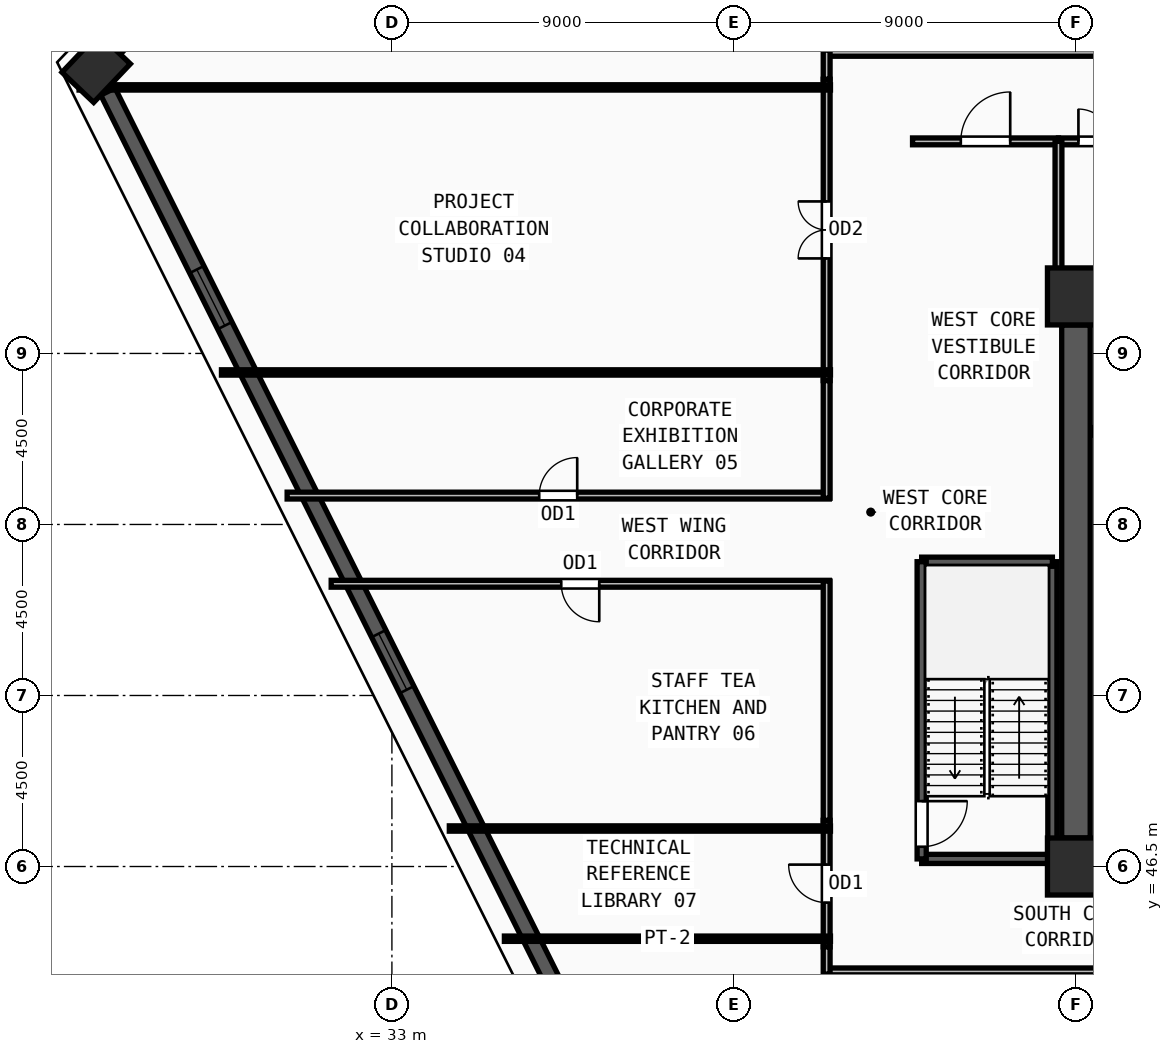
"""IFC4 building model, lengths in metres.
Left out: names, types, materials, properties, quantities, classifications, styles, units other than length and angle.
Written with IfcOpenShell. Run it as: python <this file> out.ifc"""

import sys

from ifc_helpers import new_model, si_unit, direction, frame, frame_2d, origin, origin_2d, place, context, subcontext, project, spatial, rectangle, extrude, source, transform, mapped, element, fill, save


model = new_model("IFC4")
c1 = context("Model", 3, precision=1e-05, world=origin(), true_north=direction((0.0, 1.0)))
c2 = subcontext(c1, "Body", "Model", "MODEL_VIEW")
j1 = project(units=[si_unit("LENGTHUNIT", "METRE"), si_unit("PLANEANGLEUNIT", "RADIAN")], contexts=[c1])
p1 = place(None, origin())
s1 = spatial("IfcSite", under=j1, at=p1, CompositionType="ELEMENT")
p2 = place(p1, origin())
s2 = spatial("IfcBuilding", under=s1, at=p2, CompositionType="ELEMENT")
p3 = place(p2, frame((0.0, 0.0, 166.5)))
s3 = spatial("IfcBuildingStorey", under=s2, at=p3, CompositionType="ELEMENT", Elevation=166.5)
m1 = source(origin(), c2, "Body", "SweptSolid", [
    extrude(rectangle(XDim=1.5, YDim=1.5, at=origin_2d()), origin(), (0.0, 0.0, 1.0), 3.75),
])
for number, where, z_axis, x_axis in (
    (1, (51.0, 46.5, 0.0), (0.0, 0.0, 1.0), (1.0, 0.0, 0.0)),
    (2, (51.0, 61.5, 0.0), (0.0, 0.0, 1.0), (1.0, 0.0, 0.0)),
):
    element("IfcColumn", number, at=place(p3, frame(where, z_axis=z_axis, x_axis=x_axis)), inside=s3, PredefinedType="COLUMN", context=c2, shape_type="MappedRepresentation", body=[
        mapped(m1, transform((0.0, 0.0, 0.0), x_axis=(1.0, 0.0, 0.0), y_axis=(0.0, 1.0, 0.0), z_axis=(0.0, 0.0, 1.0), scale=1.0)),
    ])
m2 = source(origin(), c2, "Body", "SweptSolid", [
    extrude(rectangle(XDim=1.4, YDim=1.15, at=origin_2d()), origin(), (0.0, 0.0, 1.0), 3.75),
])
p4 = place(p3, frame((25.218, 67.508, 0.0), z_axis=(0.0, 0.0, 1.0), x_axis=(0.689240273721, 0.724532846102, 0.0)))
e3 = element("IfcColumn", 3, at=p4, inside=s3, PredefinedType="COLUMN", context=c2, shape_type="MappedRepresentation", body=[
    mapped(m2, transform((0.0, 0.0, 0.0), x_axis=(1.0, 0.0, 0.0), y_axis=(0.0, 1.0, 0.0), z_axis=(0.0, 0.0, 1.0), scale=1.0)),
])
p5 = place(p3, frame((28.778, 71.251, 0.0), z_axis=(0.0, 0.0, 1.0), x_axis=(-0.689126443885, -0.724641114165, 0.0)))
e4 = element("IfcWall", 4, at=p5, inside=s3, PredefinedType="SOLIDWALL", context=c2, shape_type="SweptSolid", body=[
    extrude(rectangle(XDim=4.475, YDim=0.42, at=frame_2d((2.238, 0.0))), origin(), (0.0, 0.0, 1.0), 3.57),
])
m3 = source(origin(), c2, "Body", "SweptSolid", [
    extrude(rectangle(XDim=1.2, YDim=1.9, at=frame_2d((0.6, 0.95))), frame((0.0, 0.22, 0.0), z_axis=(0.0, -1.0, 0.0), x_axis=(1.0, 0.0, 0.0)), (0.0, 0.0, 1.0), 0.44),
])
p6 = place(p5, frame((1.638, 0.0, 0.55)))
e5 = element("IfcOpeningElement", 5, at=p6, cuts=e4, PredefinedType="OPENING", context=c2, shape_type="MappedRepresentation", body=[
    mapped(m3, transform((0.0, 0.0, 0.0), x_axis=(1.0, 0.0, 0.0), y_axis=(0.0, 1.0, 0.0), z_axis=(0.0, 0.0, 1.0), scale=1.0)),
])
p7 = place(p3, frame((25.526, 66.891, 0.0), z_axis=(0.0, 0.0, 1.0), x_axis=(0.446995422188, -0.894536244399, 0.0)))
e6 = element("IfcWall", 6, at=p7, inside=s3, PredefinedType="SOLIDWALL", context=c2, shape_type="SweptSolid", body=[
    extrude(rectangle(XDim=30.439, YDim=0.42, at=frame_2d((15.22, 0.0))), origin(), (0.0, 0.0, 1.0), 3.57),
])
m4 = source(origin(), c2, "Body", "SweptSolid", [
    extrude(rectangle(XDim=1.65, YDim=1.95, at=frame_2d((0.825, 0.975))), frame((0.0, 0.22, 0.0), z_axis=(0.0, -1.0, 0.0), x_axis=(1.0, 0.0, 0.0)), (0.0, 0.0, 1.0), 0.44),
])
p8 = place(p7, frame((5.235, 0.0, 0.55)))
e7 = element("IfcOpeningElement", 7, at=p8, cuts=e6, PredefinedType="OPENING", context=c2, shape_type="MappedRepresentation", body=[
    mapped(m4, transform((0.0, 0.0, 0.0), x_axis=(1.0, 0.0, 0.0), y_axis=(0.0, 1.0, 0.0), z_axis=(0.0, 0.0, 1.0), scale=1.0)),
])
p9 = place(p7, frame((15.945, 0.0, 0.55)))
e8 = element("IfcOpeningElement", 8, at=p9, cuts=e6, PredefinedType="OPENING", context=c2, shape_type="MappedRepresentation", body=[
    mapped(m4, transform((0.0, 0.0, 0.0), x_axis=(1.0, 0.0, 0.0), y_axis=(0.0, 1.0, 0.0), z_axis=(0.0, 0.0, 1.0), scale=1.0)),
])
p10 = place(p3, frame((51.0, 47.25, 0.0), z_axis=(0.0, 0.0, 1.0), x_axis=(0.0, 1.0, 0.0)))
e9 = element("IfcWall", 9, at=p10, inside=s3, PredefinedType="SHEAR", context=c2, shape_type="SweptSolid", body=[
    extrude(rectangle(XDim=13.5, YDim=0.75, at=frame_2d((6.75, 0.0))), origin(), (0.0, 0.0, 1.0), 3.57),
])
p11 = place(p3, frame((46.94, 46.7, 0.0), z_axis=(0.0, 0.0, 1.0), x_axis=(1.0, 0.0, 0.0)))
e10 = element("IfcWall", 10, at=p11, inside=s3, PredefinedType="SOLIDWALL", context=c2, shape_type="SweptSolid", body=[
    extrude(rectangle(XDim=3.44, YDim=0.24, at=frame_2d((1.72, 0.0))), origin(), (0.0, 0.0, 1.0), 3.57),
])
p12 = place(p3, frame((50.38, 46.7, 0.0), z_axis=(0.0, 0.0, 1.0), x_axis=(0.0, 1.0, 0.0)))
e11 = element("IfcWall", 11, at=p12, inside=s3, PredefinedType="SOLIDWALL", context=c2, shape_type="SweptSolid", body=[
    extrude(rectangle(XDim=7.82, YDim=0.24, at=frame_2d((3.91, 0.0))), origin(), (0.0, 0.0, 1.0), 3.57),
])
p13 = place(p3, frame((50.38, 54.52, 0.0), z_axis=(0.0, 0.0, 1.0), x_axis=(-1.0, 0.0, 0.0)))
e12 = element("IfcWall", 12, at=p13, inside=s3, PredefinedType="SOLIDWALL", context=c2, shape_type="SweptSolid", body=[
    extrude(rectangle(XDim=3.44, YDim=0.24, at=frame_2d((1.72, 0.0))), origin(), (0.0, 0.0, 1.0), 3.57),
])
p14 = place(p3, frame((46.94, 54.52, 0.0), z_axis=(0.0, 0.0, 1.0), x_axis=(0.0, -1.0, 0.0)))
e13 = element("IfcWall", 13, at=p14, inside=s3, PredefinedType="SOLIDWALL", context=c2, shape_type="SweptSolid", body=[
    extrude(rectangle(XDim=7.82, YDim=0.24, at=frame_2d((3.91, 0.0))), origin(), (0.0, 0.0, 1.0), 3.57),
])
m5 = source(origin(), c2, "Body", "SweptSolid", [
    extrude(rectangle(XDim=1.2, YDim=2.2, at=frame_2d((0.6, 1.1))), frame((0.0, 0.13, 0.0), z_axis=(0.0, -1.0, 0.0), x_axis=(1.0, 0.0, 0.0)), (0.0, 0.0, 1.0), 0.26),
])
p15 = place(p14, frame((6.3, 0.0, 0.0)))
e14 = element("IfcOpeningElement", 14, at=p15, cuts=e13, PredefinedType="OPENING", context=c2, shape_type="MappedRepresentation", body=[
    mapped(m5, transform((0.0, 0.0, 0.0), x_axis=(1.0, 0.0, 0.0), y_axis=(0.0, 1.0, 0.0), z_axis=(0.0, 0.0, 1.0), scale=1.0)),
])
for number, where, z_axis, x_axis in (
    (15, (51.4, 57.95, 0.0), (0.0, 0.0, 1.0), (1.0, 0.0, 0.0)),
    (16, (53.8, 60.88, 0.0), (0.0, 0.0, 1.0), (-1.0, 0.0, 0.0)),
):
    element("IfcWall", number, at=place(p3, frame(where, z_axis=z_axis, x_axis=x_axis)), inside=s3, PredefinedType="SOLIDWALL", context=c2, shape_type="SweptSolid", body=[
        extrude(rectangle(XDim=2.4, YDim=0.2, at=frame_2d((1.2, 0.0))), origin(), (0.0, 0.0, 1.0), 3.57),
    ])
p16 = place(p3, frame((50.54, 65.58, 0.0), z_axis=(0.0, 0.0, 1.0), x_axis=(1.0, 0.0, 0.0)))
e17 = element("IfcWall", 17, at=p16, inside=s3, PredefinedType="PARTITIONING", context=c2, shape_type="SweptSolid", body=[
    extrude(rectangle(XDim=1.9, YDim=0.18, at=frame_2d((0.95, 0.0))), origin(), (0.0, 0.0, 1.0), 3.57),
])
m6 = source(origin(), c2, "Body", "SweptSolid", [
    extrude(rectangle(XDim=0.85, YDim=2.1, at=frame_2d((0.425, 1.05))), frame((0.0, 0.1, 0.0), z_axis=(0.0, -1.0, 0.0), x_axis=(1.0, 0.0, 0.0)), (0.0, 0.0, 1.0), 0.2),
])
p17 = place(p16, frame((0.525, 0.0, 0.0)))
e18 = element("IfcOpeningElement", 18, at=p17, cuts=e17, PredefinedType="OPENING", context=c2, shape_type="MappedRepresentation", body=[
    mapped(m6, transform((0.0, 0.0, 0.0), x_axis=(1.0, 0.0, 0.0), y_axis=(0.0, 1.0, 0.0), z_axis=(0.0, 0.0, 1.0), scale=1.0)),
])
p18 = place(p3, frame((46.7, 65.58, 0.0), z_axis=(0.0, 0.0, 1.0), x_axis=(1.0, 0.0, 0.0)))
e19 = element("IfcWall", 19, at=p18, inside=s3, PredefinedType="PARTITIONING", context=c2, shape_type="SweptSolid", body=[
    extrude(rectangle(XDim=3.84, YDim=0.18, at=frame_2d((1.92, 0.0))), origin(), (0.0, 0.0, 1.0), 3.57),
])
m7 = source(origin(), c2, "Body", "SweptSolid", [
    extrude(rectangle(XDim=1.3, YDim=2.2, at=frame_2d((0.65, 1.1))), frame((0.0, 0.1, 0.0), z_axis=(0.0, -1.0, 0.0), x_axis=(1.0, 0.0, 0.0)), (0.0, 0.0, 1.0), 0.2),
])
p19 = place(p18, frame((1.27, 0.0, 0.0)))
e20 = element("IfcOpeningElement", 20, at=p19, cuts=e19, PredefinedType="OPENING", context=c2, shape_type="MappedRepresentation", body=[
    mapped(m7, transform((0.0, 0.0, 0.0), x_axis=(1.0, 0.0, 0.0), y_axis=(0.0, 1.0, 0.0), z_axis=(0.0, 0.0, 1.0), scale=1.0)),
])
p20 = place(p3, frame((44.37, 67.91, 0.0), z_axis=(0.0, 0.0, 1.0), x_axis=(1.0, 0.0, 0.0)))
e21 = element("IfcWall", 21, at=p20, inside=s3, PredefinedType="PARTITIONING", context=c2, shape_type="SweptSolid", body=[
    extrude(rectangle(XDim=17.415, YDim=0.18, at=frame_2d((8.708, 0.0))), origin(), (0.0, 0.0, 1.0), 3.57),
])
m8 = source(origin(), c2, "Body", "SweptSolid", [
    extrude(rectangle(XDim=1.5, YDim=2.2, at=frame_2d((0.75, 1.1))), frame((0.0, 0.1, 0.0), z_axis=(0.0, -1.0, 0.0), x_axis=(1.0, 0.0, 0.0)), (0.0, 0.0, 1.0), 0.2),
])
p21 = place(p20, frame((7.957, 0.0, 0.0)))
e22 = element("IfcOpeningElement", 22, at=p21, cuts=e21, PredefinedType="OPENING", context=c2, shape_type="MappedRepresentation", body=[
    mapped(m8, transform((0.0, 0.0, 0.0), x_axis=(1.0, 0.0, 0.0), y_axis=(0.0, 1.0, 0.0), z_axis=(0.0, 0.0, 1.0), scale=1.0)),
])
p22 = place(p3, frame((44.44, 59.285, 0.0), z_axis=(0.0, 0.0, 1.0), x_axis=(0.0, 1.0, 0.0)))
e23 = element("IfcWall", 23, at=p22, inside=s3, PredefinedType="PARTITIONING", context=c2, shape_type="SweptSolid", body=[
    extrude(rectangle(XDim=7.93, YDim=0.18, at=frame_2d((3.965, 0.0))), origin(), (0.0, 0.0, 1.0), 3.57),
])
p23 = place(p22, frame((3.215, 0.0, 0.0)))
e24 = element("IfcOpeningElement", 24, at=p23, cuts=e23, PredefinedType="OPENING", context=c2, shape_type="MappedRepresentation", body=[
    mapped(m8, transform((0.0, 0.0, 0.0), x_axis=(1.0, 0.0, 0.0), y_axis=(0.0, 1.0, 0.0), z_axis=(0.0, 0.0, 1.0), scale=1.0)),
])
p24 = place(p3, frame((30.243, 56.26, 0.0), z_axis=(0.0, 0.0, 1.0), x_axis=(1.0, 0.0, 0.0)))
e25 = element("IfcWall", 25, at=p24, inside=s3, PredefinedType="PARTITIONING", context=c2, shape_type="SweptSolid", body=[
    extrude(rectangle(XDim=14.267, YDim=0.18, at=frame_2d((7.134, 0.0))), origin(), (0.0, 0.0, 1.0), 3.57),
])
m9 = source(origin(), c2, "Body", "SweptSolid", [
    extrude(rectangle(XDim=1.0, YDim=2.2, at=frame_2d((0.5, 1.1))), frame((0.0, 0.1, 0.0), z_axis=(0.0, -1.0, 0.0), x_axis=(1.0, 0.0, 0.0)), (0.0, 0.0, 1.0), 0.2),
])
p25 = place(p24, frame((6.633, 0.0, 0.0)))
e26 = element("IfcOpeningElement", 26, at=p25, cuts=e25, PredefinedType="OPENING", context=c2, shape_type="MappedRepresentation", body=[
    mapped(m9, transform((0.0, 0.0, 0.0), x_axis=(1.0, 0.0, 0.0), y_axis=(0.0, 1.0, 0.0), z_axis=(0.0, 0.0, 1.0), scale=1.0)),
])
p26 = place(p3, frame((44.51, 53.94, 0.0), z_axis=(0.0, 0.0, 1.0), x_axis=(-1.0, 0.0, 0.0)))
e27 = element("IfcWall", 27, at=p26, inside=s3, PredefinedType="PARTITIONING", context=c2, shape_type="SweptSolid", body=[
    extrude(rectangle(XDim=13.108, YDim=0.18, at=frame_2d((6.554, 0.0))), origin(), (0.0, 0.0, 1.0), 3.57),
])
p27 = place(p26, frame((6.054, 0.0, 0.0)))
e28 = element("IfcOpeningElement", 28, at=p27, cuts=e27, PredefinedType="OPENING", context=c2, shape_type="MappedRepresentation", body=[
    mapped(m9, transform((0.0, 0.0, 0.0), x_axis=(1.0, 0.0, 0.0), y_axis=(0.0, 1.0, 0.0), z_axis=(0.0, 0.0, 1.0), scale=1.0)),
])
p28 = place(p3, frame((44.44, 44.385, 0.0), z_axis=(0.0, 0.0, 1.0), x_axis=(0.0, 1.0, 0.0)))
e29 = element("IfcWall", 29, at=p28, inside=s3, PredefinedType="PARTITIONING", context=c2, shape_type="SweptSolid", body=[
    extrude(rectangle(XDim=3.33, YDim=0.18, at=frame_2d((1.665, 0.0))), origin(), (0.0, 0.0, 1.0), 3.57),
])
p29 = place(p28, frame((1.165, 0.0, 0.0)))
e30 = element("IfcOpeningElement", 30, at=p29, cuts=e29, PredefinedType="OPENING", context=c2, shape_type="MappedRepresentation", body=[
    mapped(m9, transform((0.0, 0.0, 0.0), x_axis=(1.0, 0.0, 0.0), y_axis=(0.0, 1.0, 0.0), z_axis=(0.0, 0.0, 1.0), scale=1.0)),
])
p30 = place(p3, frame((75.63, 43.74, 0.0), z_axis=(0.0, 0.0, 1.0), x_axis=(-1.0, 0.0, 0.0)))
e31 = element("IfcWall", 31, at=p30, inside=s3, PredefinedType="PARTITIONING", context=c2, shape_type="SweptSolid", body=[
    extrude(rectangle(XDim=31.26, YDim=0.18, at=frame_2d((15.63, 0.0))), origin(), (0.0, 0.0, 1.0), 3.57),
])
p31 = place(p30, frame((10.08, 0.0, 0.0)))
e32 = element("IfcOpeningElement", 32, at=p31, cuts=e31, PredefinedType="OPENING", context=c2, shape_type="MappedRepresentation", body=[
    mapped(m8, transform((0.0, 0.0, 0.0), x_axis=(1.0, 0.0, 0.0), y_axis=(0.0, 1.0, 0.0), z_axis=(0.0, 0.0, 1.0), scale=1.0)),
])
p32 = place(p3, frame((50.54, 61.95, 0.0), z_axis=(0.0, 0.0, 1.0), x_axis=(0.0, 1.0, 0.0)))
e33 = element("IfcWall", 33, at=p32, inside=s3, PredefinedType="PARTITIONING", context=c2, shape_type="SweptSolid", body=[
    extrude(rectangle(XDim=3.63, YDim=0.18, at=frame_2d((1.815, 0.0))), origin(), (0.0, 0.0, 1.0), 3.57),
])
p33 = place(p3, frame((44.44, 67.215, 0.0), z_axis=(0.0, 0.0, 1.0), x_axis=(0.0, 1.0, 0.0)))
e34 = element("IfcWall", 34, at=p33, inside=s3, PredefinedType="PARTITIONING", context=c2, shape_type="SweptSolid", body=[
    extrude(rectangle(XDim=0.765, YDim=0.18, at=frame_2d((0.382, 0.0))), origin(), (0.0, 0.0, 1.0), 3.57),
])
p34 = place(p3, frame((44.44, 56.19, 0.0), z_axis=(0.0, 0.0, 1.0), x_axis=(0.0, 1.0, 0.0)))
e35 = element("IfcWall", 35, at=p34, inside=s3, PredefinedType="PARTITIONING", context=c2, shape_type="SweptSolid", body=[
    extrude(rectangle(XDim=3.095, YDim=0.18, at=frame_2d((1.547, 0.0))), origin(), (0.0, 0.0, 1.0), 3.57),
])
p35 = place(p3, frame((44.44, 47.715, 0.0), z_axis=(0.0, 0.0, 1.0), x_axis=(0.0, 1.0, 0.0)))
e36 = element("IfcWall", 36, at=p35, inside=s3, PredefinedType="PARTITIONING", context=c2, shape_type="SweptSolid", body=[
    extrude(rectangle(XDim=6.295, YDim=0.18, at=frame_2d((3.147, 0.0))), origin(), (0.0, 0.0, 1.0), 3.57),
])
p36 = place(p3, frame((44.44, 43.67, 0.0), z_axis=(0.0, 0.0, 1.0), x_axis=(0.0, 1.0, 0.0)))
e37 = element("IfcWall", 37, at=p36, inside=s3, PredefinedType="PARTITIONING", context=c2, shape_type="SweptSolid", body=[
    extrude(rectangle(XDim=0.715, YDim=0.18, at=frame_2d((0.357, 0.0))), origin(), (0.0, 0.0, 1.0), 3.57),
])
p37 = place(p3, frame((44.54, 44.6, 0.0), z_axis=(0.0, 0.0, 1.0), x_axis=(-1.0, 0.0, 0.0)))
e38 = element("IfcWall", 38, at=p37, inside=s3, PredefinedType="PARTITIONING", context=c2, shape_type="SweptSolid", body=[
    extrude(rectangle(XDim=8.58, YDim=0.14, at=frame_2d((4.29, 0.0))), origin(), (0.0, 0.0, 1.0), 3.57),
])
p38 = place(p3, frame((44.54, 47.5, 0.0), z_axis=(0.0, 0.0, 1.0), x_axis=(-1.0, 0.0, 0.0)))
e39 = element("IfcWall", 39, at=p38, inside=s3, PredefinedType="PARTITIONING", context=c2, shape_type="SweptSolid", body=[
    extrude(rectangle(XDim=10.029, YDim=0.14, at=frame_2d((5.015, 0.0))), origin(), (0.0, 0.0, 1.0), 3.57),
])
p39 = place(p3, frame((44.54, 59.5, 0.0), z_axis=(0.0, 0.0, 1.0), x_axis=(-1.0, 0.0, 0.0)))
e40 = element("IfcWall", 40, at=p39, inside=s3, PredefinedType="PARTITIONING", context=c2, shape_type="SweptSolid", body=[
    extrude(rectangle(XDim=16.025, YDim=0.14, at=frame_2d((8.013, 0.0))), origin(), (0.0, 0.0, 1.0), 3.57),
])
p40 = place(p3, frame((44.54, 67.0, 0.0), z_axis=(0.0, 0.0, 1.0), x_axis=(-1.0, 0.0, 0.0)))
e41 = element("IfcWall", 41, at=p40, inside=s3, PredefinedType="PARTITIONING", context=c2, shape_type="SweptSolid", body=[
    extrude(rectangle(XDim=19.772, YDim=0.14, at=frame_2d((9.886, 0.0))), origin(), (0.0, 0.0, 1.0), 2.755),
])
m10 = source(origin(), c2, "Body", "SweptSolid", [
    extrude(rectangle(XDim=1.65, YDim=1.95, at=frame_2d((0.825, 0.975))), frame((0.0, 0.03, 0.0), z_axis=(0.0, -1.0, 0.0), x_axis=(1.0, 0.0, 0.0)), (0.0, 0.0, 1.0), 0.06),
])
p41 = place(p8, origin())
e42 = element("IfcWindow", 42, at=p41, inside=s3, PartitioningType="DOUBLE_PANEL_VERTICAL", PredefinedType="WINDOW", context=c2, shape_type="MappedRepresentation", body=[
    mapped(m10, transform((0.0, 0.0, 0.0), x_axis=(1.0, 0.0, 0.0), y_axis=(0.0, 1.0, 0.0), z_axis=(0.0, 0.0, 1.0), scale=1.0)),
])
fill(e7, e42)
p42 = place(p9, origin())
e43 = element("IfcWindow", 43, at=p42, inside=s3, PartitioningType="DOUBLE_PANEL_VERTICAL", PredefinedType="WINDOW", context=c2, shape_type="MappedRepresentation", body=[
    mapped(m10, transform((0.0, 0.0, 0.0), x_axis=(1.0, 0.0, 0.0), y_axis=(0.0, 1.0, 0.0), z_axis=(0.0, 0.0, 1.0), scale=1.0)),
])
fill(e8, e43)
m11 = source(origin(), c2, "Body", "SweptSolid", [
    extrude(rectangle(XDim=1.2, YDim=2.2, at=frame_2d((0.6, 1.1))), frame((0.0, 0.025, 0.0), z_axis=(0.0, -1.0, 0.0), x_axis=(1.0, 0.0, 0.0)), (0.0, 0.0, 1.0), 0.05),
])
p43 = place(p15, origin())
e44 = element("IfcDoor", 44, at=p43, inside=s3, OperationType="SINGLE_SWING_LEFT", PredefinedType="DOOR", context=c2, shape_type="MappedRepresentation", body=[
    mapped(m11, transform((0.0, 0.0, 0.0), x_axis=(1.0, 0.0, 0.0), y_axis=(0.0, 1.0, 0.0), z_axis=(0.0, 0.0, 1.0), scale=1.0)),
])
fill(e14, e44)
m12 = source(origin(), c2, "Body", "SweptSolid", [
    extrude(rectangle(XDim=0.85, YDim=2.1, at=frame_2d((0.425, 1.05))), frame((0.0, 0.025, 0.0), z_axis=(0.0, -1.0, 0.0), x_axis=(1.0, 0.0, 0.0)), (0.0, 0.0, 1.0), 0.05),
])
p44 = place(p17, origin())
e45 = element("IfcDoor", 45, at=p44, inside=s3, OperationType="SINGLE_SWING_LEFT", PredefinedType="DOOR", context=c2, shape_type="MappedRepresentation", body=[
    mapped(m12, transform((0.0, 0.0, 0.0), x_axis=(1.0, 0.0, 0.0), y_axis=(0.0, 1.0, 0.0), z_axis=(0.0, 0.0, 1.0), scale=1.0)),
])
fill(e18, e45)
m13 = source(origin(), c2, "Body", "SweptSolid", [
    extrude(rectangle(XDim=1.3, YDim=2.2, at=frame_2d((0.65, 1.1))), frame((0.0, 0.025, 0.0), z_axis=(0.0, -1.0, 0.0), x_axis=(1.0, 0.0, 0.0)), (0.0, 0.0, 1.0), 0.05),
])
p45 = place(p19, origin())
e46 = element("IfcDoor", 46, at=p45, inside=s3, OperationType="SINGLE_SWING_RIGHT", PredefinedType="DOOR", context=c2, shape_type="MappedRepresentation", body=[
    mapped(m13, transform((0.0, 0.0, 0.0), x_axis=(1.0, 0.0, 0.0), y_axis=(0.0, 1.0, 0.0), z_axis=(0.0, 0.0, 1.0), scale=1.0)),
])
fill(e20, e46)
m14 = source(origin(), c2, "Body", "SweptSolid", [
    extrude(rectangle(XDim=1.5, YDim=2.2, at=frame_2d((0.75, 1.1))), frame((0.0, 0.025, 0.0), z_axis=(0.0, -1.0, 0.0), x_axis=(1.0, 0.0, 0.0)), (0.0, 0.0, 1.0), 0.05),
])
p46 = place(p23, origin())
e47 = element("IfcDoor", 47, at=p46, inside=s3, OperationType="DOUBLE_DOOR_SINGLE_SWING", PredefinedType="DOOR", context=c2, shape_type="MappedRepresentation", body=[
    mapped(m14, transform((0.0, 0.0, 0.0), x_axis=(1.0, 0.0, 0.0), y_axis=(0.0, 1.0, 0.0), z_axis=(0.0, 0.0, 1.0), scale=1.0)),
])
fill(e24, e47)
m15 = source(origin(), c2, "Body", "SweptSolid", [
    extrude(rectangle(XDim=1.0, YDim=2.2, at=frame_2d((0.5, 1.1))), frame((0.0, 0.025, 0.0), z_axis=(0.0, -1.0, 0.0), x_axis=(1.0, 0.0, 0.0)), (0.0, 0.0, 1.0), 0.05),
])
p47 = place(p25, origin())
e48 = element("IfcDoor", 48, at=p47, inside=s3, OperationType="SINGLE_SWING_RIGHT", PredefinedType="DOOR", context=c2, shape_type="MappedRepresentation", body=[
    mapped(m15, transform((0.0, 0.0, 0.0), x_axis=(1.0, 0.0, 0.0), y_axis=(0.0, 1.0, 0.0), z_axis=(0.0, 0.0, 1.0), scale=1.0)),
])
fill(e26, e48)
p48 = place(p27, origin())
e49 = element("IfcDoor", 49, at=p48, inside=s3, OperationType="SINGLE_SWING_LEFT", PredefinedType="DOOR", context=c2, shape_type="MappedRepresentation", body=[
    mapped(m15, transform((0.0, 0.0, 0.0), x_axis=(1.0, 0.0, 0.0), y_axis=(0.0, 1.0, 0.0), z_axis=(0.0, 0.0, 1.0), scale=1.0)),
])
fill(e28, e49)
p49 = place(p29, origin())
e50 = element("IfcDoor", 50, at=p49, inside=s3, OperationType="SINGLE_SWING_RIGHT", PredefinedType="DOOR", context=c2, shape_type="MappedRepresentation", body=[
    mapped(m15, transform((0.0, 0.0, 0.0), x_axis=(1.0, 0.0, 0.0), y_axis=(0.0, 1.0, 0.0), z_axis=(0.0, 0.0, 1.0), scale=1.0)),
])
fill(e30, e50)
save(model, sys.argv[1])
